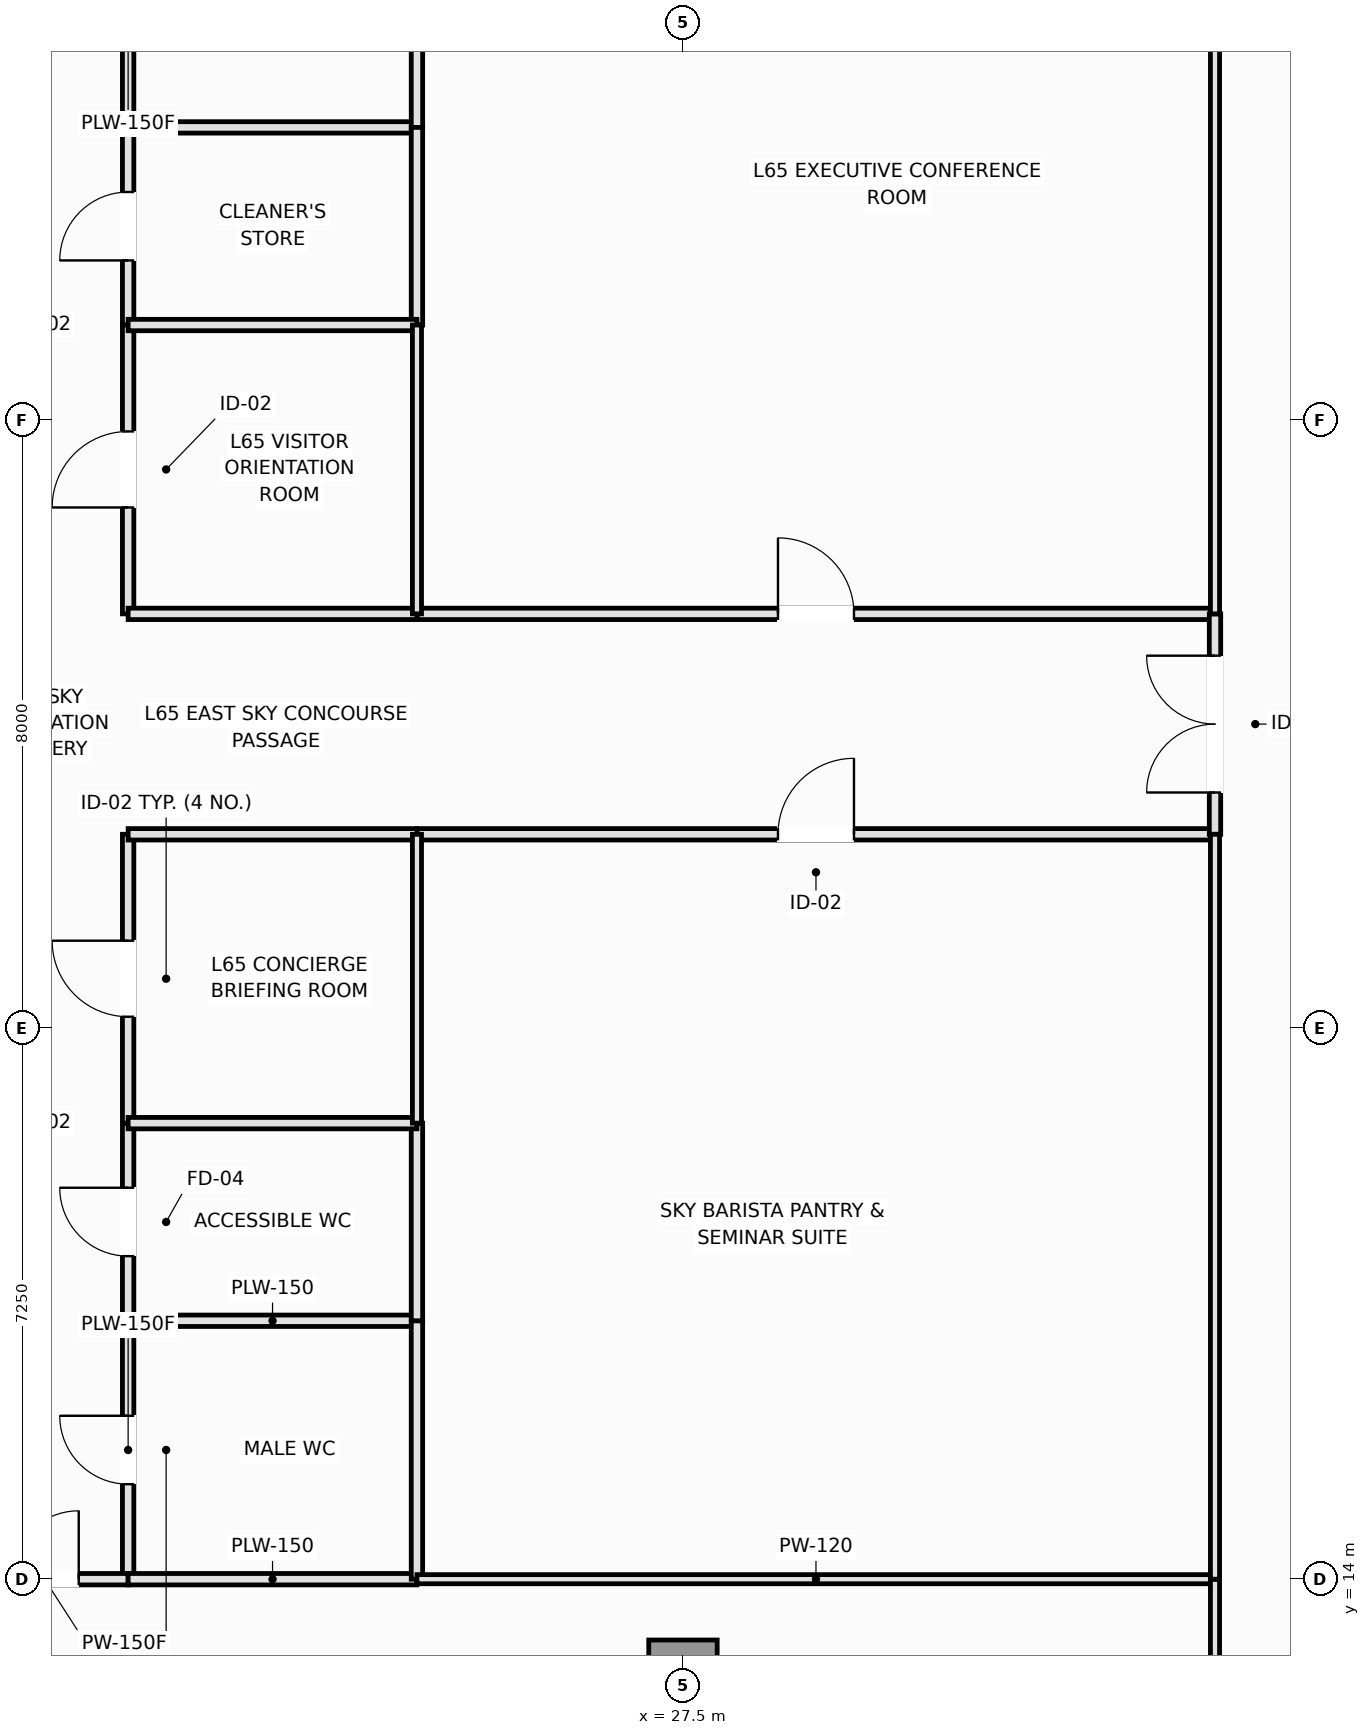
"""IFC4 building model, lengths in metres.
Left out: names, types, materials, properties, quantities, classifications, styles, units other than length and angle.
Written with IfcOpenShell. Run it as: python <this file> out.ifc"""

import sys

from ifc_helpers import new_model, si_unit, direction, frame, frame_2d, origin, origin_2d, place, context, subcontext, project, spatial, rectangle, extrude, element, fill, save


model = new_model("IFC4")
c1 = context("Model", 3, precision=1e-05, world=origin(), true_north=direction((0.0, 1.0)))
c2 = subcontext(c1, "Body", "Model", "MODEL_VIEW")
j1 = project(units=[si_unit("LENGTHUNIT", "METRE"), si_unit("PLANEANGLEUNIT", "RADIAN")], contexts=[c1])
p1 = place(None, origin())
s1 = spatial("IfcSite", under=j1, at=p1, CompositionType="ELEMENT")
p2 = place(p1, origin())
s2 = spatial("IfcBuilding", under=s1, at=p2, CompositionType="ELEMENT")
p3 = place(p2, frame((0.0, 0.0, 244.85)))
s3 = spatial("IfcBuildingStorey", under=s2, at=p3, CompositionType="ELEMENT", Elevation=244.85)
p4 = place(p3, frame((27.5, 12.75, 0.0), z_axis=(0.0, 0.0, 1.0), x_axis=(1.0, 0.0, 0.0)))
e1 = element("IfcColumn", 1, at=p4, inside=s3, PredefinedType="COLUMN", context=c2, shape_type="SweptSolid", body=[
    extrude(rectangle(XDim=0.9, YDim=0.9, at=origin_2d()), origin(), (0.0, 0.0, 1.0), 4.4),
])
p5 = place(p3, frame((20.2, 14.0, 0.0), z_axis=(0.0, 0.0, 1.0), x_axis=(0.0, 1.0, 0.0)))
e2 = element("IfcWall", 2, at=p5, inside=s3, PredefinedType="PLUMBINGWALL", context=c2, shape_type="SweptSolid", body=[
    extrude(rectangle(XDim=3.4, YDim=0.15, at=frame_2d((1.7, 0.0))), origin(), (0.0, 0.0, 1.0), 4.24),
])
p6 = place(p5, frame((1.25, 0.0, 0.0)))
e3 = element("IfcOpeningElement", 3, at=p6, cuts=e2, PredefinedType="OPENING", context=c2, shape_type="SweptSolid", body=[
    extrude(rectangle(XDim=0.9, YDim=2.1, at=frame_2d((0.45, 1.05))), frame((0.0, 0.085, 0.0), z_axis=(0.0, -1.0, 0.0), x_axis=(1.0, 0.0, 0.0)), (0.0, 0.0, 1.0), 0.17),
])
p7 = place(p3, frame((20.2, 33.1, 0.0), z_axis=(0.0, 0.0, 1.0), x_axis=(0.0, 1.0, 0.0)))
e4 = element("IfcWall", 4, at=p7, inside=s3, PredefinedType="PLUMBINGWALL", context=c2, shape_type="SweptSolid", body=[
    extrude(rectangle(XDim=3.4, YDim=0.15, at=frame_2d((1.7, 0.0))), origin(), (0.0, 0.0, 1.0), 4.24),
])
p8 = place(p7, frame((1.25, 0.0, 0.0)))
e5 = element("IfcOpeningElement", 5, at=p8, cuts=e4, PredefinedType="OPENING", context=c2, shape_type="SweptSolid", body=[
    extrude(rectangle(XDim=0.9, YDim=2.1, at=frame_2d((0.45, 1.05))), frame((0.0, 0.085, 0.0), z_axis=(0.0, -1.0, 0.0), x_axis=(1.0, 0.0, 0.0)), (0.0, 0.0, 1.0), 0.17),
])
p9 = place(p3, frame((20.2, 17.4, 0.0), z_axis=(0.0, 0.0, 1.0), x_axis=(0.0, 1.0, 0.0)))
e6 = element("IfcWall", 6, at=p9, inside=s3, PredefinedType="PLUMBINGWALL", context=c2, shape_type="SweptSolid", body=[
    extrude(rectangle(XDim=2.6, YDim=0.15, at=frame_2d((1.3, 0.0))), origin(), (0.0, 0.0, 1.0), 4.24),
])
p10 = place(p9, frame((0.85, 0.0, 0.0)))
e7 = element("IfcOpeningElement", 7, at=p10, cuts=e6, PredefinedType="OPENING", context=c2, shape_type="SweptSolid", body=[
    extrude(rectangle(XDim=0.9, YDim=2.1, at=frame_2d((0.45, 1.05))), frame((0.0, 0.085, 0.0), z_axis=(0.0, -1.0, 0.0), x_axis=(1.0, 0.0, 0.0)), (0.0, 0.0, 1.0), 0.17),
])
p11 = place(p3, frame((20.2, 30.5, 0.0), z_axis=(0.0, 0.0, 1.0), x_axis=(0.0, 1.0, 0.0)))
e8 = element("IfcWall", 8, at=p11, inside=s3, PredefinedType="PLUMBINGWALL", context=c2, shape_type="SweptSolid", body=[
    extrude(rectangle(XDim=2.6, YDim=0.15, at=frame_2d((1.3, 0.0))), origin(), (0.0, 0.0, 1.0), 4.24),
])
p12 = place(p11, frame((0.85, 0.0, 0.0)))
e9 = element("IfcOpeningElement", 9, at=p12, cuts=e8, PredefinedType="OPENING", context=c2, shape_type="SweptSolid", body=[
    extrude(rectangle(XDim=0.9, YDim=2.1, at=frame_2d((0.45, 1.05))), frame((0.0, 0.085, 0.0), z_axis=(0.0, -1.0, 0.0), x_axis=(1.0, 0.0, 0.0)), (0.0, 0.0, 1.0), 0.17),
])
p13 = place(p3, frame((18.0, 14.0, 0.0), z_axis=(0.0, 0.0, 1.0), x_axis=(1.0, 0.0, 0.0)))
e10 = element("IfcWall", 10, at=p13, inside=s3, PredefinedType="PARTITIONING", context=c2, shape_type="SweptSolid", body=[
    extrude(rectangle(XDim=2.2, YDim=0.15, at=frame_2d((1.1, 0.0))), origin(), (0.0, 0.0, 1.0), 4.24),
])
p14 = place(p13, frame((0.65, 0.0, 0.0)))
e11 = element("IfcOpeningElement", 11, at=p14, cuts=e10, PredefinedType="OPENING", context=c2, shape_type="SweptSolid", body=[
    extrude(rectangle(XDim=0.9, YDim=2.1, at=frame_2d((0.45, 1.05))), frame((0.0, 0.085, 0.0), z_axis=(0.0, -1.0, 0.0), x_axis=(1.0, 0.0, 0.0)), (0.0, 0.0, 1.0), 0.17),
])
p15 = place(p3, frame((20.2, 20.0, 0.0), z_axis=(0.0, 0.0, 1.0), x_axis=(0.0, 1.0, 0.0)))
e12 = element("IfcWall", 12, at=p15, inside=s3, PredefinedType="PARTITIONING", context=c2, shape_type="SweptSolid", body=[
    extrude(rectangle(XDim=3.8, YDim=0.15, at=frame_2d((1.9, 0.0))), origin(), (0.0, 0.0, 1.0), 4.24),
])
p16 = place(p15, frame((1.4, 0.0, 0.0)))
e13 = element("IfcOpeningElement", 13, at=p16, cuts=e12, PredefinedType="OPENING", context=c2, shape_type="SweptSolid", body=[
    extrude(rectangle(XDim=1.0, YDim=2.15, at=frame_2d((0.5, 1.075))), frame((0.0, 0.085, 0.0), z_axis=(0.0, -1.0, 0.0), x_axis=(1.0, 0.0, 0.0)), (0.0, 0.0, 1.0), 0.17),
])
p17 = place(p3, frame((20.2, 26.7, 0.0), z_axis=(0.0, 0.0, 1.0), x_axis=(0.0, 1.0, 0.0)))
e14 = element("IfcWall", 14, at=p17, inside=s3, PredefinedType="PARTITIONING", context=c2, shape_type="SweptSolid", body=[
    extrude(rectangle(XDim=3.8, YDim=0.15, at=frame_2d((1.9, 0.0))), origin(), (0.0, 0.0, 1.0), 4.24),
])
p18 = place(p17, frame((1.4, 0.0, 0.0)))
e15 = element("IfcOpeningElement", 15, at=p18, cuts=e14, PredefinedType="OPENING", context=c2, shape_type="SweptSolid", body=[
    extrude(rectangle(XDim=1.0, YDim=2.15, at=frame_2d((0.5, 1.075))), frame((0.0, 0.085, 0.0), z_axis=(0.0, -1.0, 0.0), x_axis=(1.0, 0.0, 0.0)), (0.0, 0.0, 1.0), 0.17),
])
p19 = place(p3, frame((24.0, 23.8, 0.0), z_axis=(0.0, 0.0, 1.0), x_axis=(1.0, 0.0, 0.0)))
e16 = element("IfcWall", 16, at=p19, inside=s3, PredefinedType="PARTITIONING", context=c2, shape_type="SweptSolid", body=[
    extrude(rectangle(XDim=10.5, YDim=0.15, at=frame_2d((5.25, 0.0))), origin(), (0.0, 0.0, 1.0), 4.24),
])
p20 = place(p19, frame((4.75, 0.0, 0.0)))
e17 = element("IfcOpeningElement", 17, at=p20, cuts=e16, PredefinedType="OPENING", context=c2, shape_type="SweptSolid", body=[
    extrude(rectangle(XDim=1.0, YDim=2.15, at=frame_2d((0.5, 1.075))), frame((0.0, 0.085, 0.0), z_axis=(0.0, -1.0, 0.0), x_axis=(1.0, 0.0, 0.0)), (0.0, 0.0, 1.0), 0.17),
])
p21 = place(p3, frame((24.0, 26.7, 0.0), z_axis=(0.0, 0.0, 1.0), x_axis=(1.0, 0.0, 0.0)))
e18 = element("IfcWall", 18, at=p21, inside=s3, PredefinedType="PARTITIONING", context=c2, shape_type="SweptSolid", body=[
    extrude(rectangle(XDim=10.5, YDim=0.15, at=frame_2d((5.25, 0.0))), origin(), (0.0, 0.0, 1.0), 4.24),
])
p22 = place(p21, frame((4.75, 0.0, 0.0)))
e19 = element("IfcOpeningElement", 19, at=p22, cuts=e18, PredefinedType="OPENING", context=c2, shape_type="SweptSolid", body=[
    extrude(rectangle(XDim=1.0, YDim=2.15, at=frame_2d((0.5, 1.075))), frame((0.0, 0.085, 0.0), z_axis=(0.0, -1.0, 0.0), x_axis=(1.0, 0.0, 0.0)), (0.0, 0.0, 1.0), 0.17),
])
p23 = place(p3, frame((34.5, 23.8, 0.0), z_axis=(0.0, 0.0, 1.0), x_axis=(0.0, 1.0, 0.0)))
e20 = element("IfcWall", 20, at=p23, inside=s3, PredefinedType="PARTITIONING", context=c2, shape_type="SweptSolid", body=[
    extrude(rectangle(XDim=2.9, YDim=0.15, at=frame_2d((1.45, 0.0))), origin(), (0.0, 0.0, 1.0), 4.24),
])
p24 = place(p23, frame((0.55, 0.0, 0.0)))
e21 = element("IfcOpeningElement", 21, at=p24, cuts=e20, PredefinedType="OPENING", context=c2, shape_type="SweptSolid", body=[
    extrude(rectangle(XDim=1.8, YDim=2.2, at=frame_2d((0.9, 1.1))), frame((0.0, 0.085, 0.0), z_axis=(0.0, -1.0, 0.0), x_axis=(1.0, 0.0, 0.0)), (0.0, 0.0, 1.0), 0.17),
])
for number, where, z_axis, x_axis in (
    (22, (20.2, 23.8, 0.0), (0.0, 0.0, 1.0), (1.0, 0.0, 0.0)),
    (23, (20.2, 26.7, 0.0), (0.0, 0.0, 1.0), (1.0, 0.0, 0.0)),
):
    element("IfcWall", number, at=place(p3, frame(where, z_axis=z_axis, x_axis=x_axis)), inside=s3, PredefinedType="PARTITIONING", context=c2, shape_type="SweptSolid", body=[
        extrude(rectangle(XDim=3.8, YDim=0.15, at=frame_2d((1.9, 0.0))), origin(), (0.0, 0.0, 1.0), 4.24),
    ])
for number, where, z_axis, x_axis in (
    (24, (20.2, 17.4, 0.0), (0.0, 0.0, 1.0), (1.0, 0.0, 0.0)),
    (25, (20.2, 14.0, 0.0), (0.0, 0.0, 1.0), (1.0, 0.0, 0.0)),
):
    element("IfcWall", number, at=place(p3, frame(where, z_axis=z_axis, x_axis=x_axis)), inside=s3, PredefinedType="PLUMBINGWALL", context=c2, shape_type="SweptSolid", body=[
        extrude(rectangle(XDim=3.8, YDim=0.15, at=frame_2d((1.9, 0.0))), origin(), (0.0, 0.0, 1.0), 4.24),
    ])
p25 = place(p3, frame((24.0, 14.0, 0.0), z_axis=(0.0, 0.0, 1.0), x_axis=(0.0, 1.0, 0.0)))
e26 = element("IfcWall", 26, at=p25, inside=s3, PredefinedType="PLUMBINGWALL", context=c2, shape_type="SweptSolid", body=[
    extrude(rectangle(XDim=3.4, YDim=0.15, at=frame_2d((1.7, 0.0))), origin(), (0.0, 0.0, 1.0), 4.24),
])
p26 = place(p3, frame((20.2, 33.1, 0.0), z_axis=(0.0, 0.0, 1.0), x_axis=(1.0, 0.0, 0.0)))
e27 = element("IfcWall", 27, at=p26, inside=s3, PredefinedType="PLUMBINGWALL", context=c2, shape_type="SweptSolid", body=[
    extrude(rectangle(XDim=3.8, YDim=0.15, at=frame_2d((1.9, 0.0))), origin(), (0.0, 0.0, 1.0), 4.24),
])
p27 = place(p3, frame((24.0, 33.1, 0.0), z_axis=(0.0, 0.0, 1.0), x_axis=(0.0, 1.0, 0.0)))
e28 = element("IfcWall", 28, at=p27, inside=s3, PredefinedType="PLUMBINGWALL", context=c2, shape_type="SweptSolid", body=[
    extrude(rectangle(XDim=3.4, YDim=0.15, at=frame_2d((1.7, 0.0))), origin(), (0.0, 0.0, 1.0), 4.24),
])
p28 = place(p3, frame((24.0, 17.4, 0.0), z_axis=(0.0, 0.0, 1.0), x_axis=(0.0, 1.0, 0.0)))
e29 = element("IfcWall", 29, at=p28, inside=s3, PredefinedType="PLUMBINGWALL", context=c2, shape_type="SweptSolid", body=[
    extrude(rectangle(XDim=2.6, YDim=0.15, at=frame_2d((1.3, 0.0))), origin(), (0.0, 0.0, 1.0), 4.24),
])
p29 = place(p3, frame((20.2, 20.0, 0.0), z_axis=(0.0, 0.0, 1.0), x_axis=(1.0, 0.0, 0.0)))
e30 = element("IfcWall", 30, at=p29, inside=s3, PredefinedType="PLUMBINGWALL", context=c2, shape_type="SweptSolid", body=[
    extrude(rectangle(XDim=3.8, YDim=0.15, at=frame_2d((1.9, 0.0))), origin(), (0.0, 0.0, 1.0), 4.24),
])
p30 = place(p3, frame((24.0, 30.5, 0.0), z_axis=(0.0, 0.0, 1.0), x_axis=(0.0, 1.0, 0.0)))
e31 = element("IfcWall", 31, at=p30, inside=s3, PredefinedType="PLUMBINGWALL", context=c2, shape_type="SweptSolid", body=[
    extrude(rectangle(XDim=2.6, YDim=0.15, at=frame_2d((1.3, 0.0))), origin(), (0.0, 0.0, 1.0), 4.24),
])
p31 = place(p3, frame((20.2, 30.5, 0.0), z_axis=(0.0, 0.0, 1.0), x_axis=(1.0, 0.0, 0.0)))
e32 = element("IfcWall", 32, at=p31, inside=s3, PredefinedType="PLUMBINGWALL", context=c2, shape_type="SweptSolid", body=[
    extrude(rectangle(XDim=3.8, YDim=0.15, at=frame_2d((1.9, 0.0))), origin(), (0.0, 0.0, 1.0), 4.24),
])
p32 = place(p3, frame((24.0, 14.0, 0.0), z_axis=(0.0, 0.0, 1.0), x_axis=(1.0, 0.0, 0.0)))
e33 = element("IfcWall", 33, at=p32, inside=s3, PredefinedType="PARTITIONING", context=c2, shape_type="SweptSolid", body=[
    extrude(rectangle(XDim=10.5, YDim=0.12, at=frame_2d((5.25, 0.0))), origin(), (0.0, 0.0, 1.0), 4.24),
])
p33 = place(p3, frame((34.5, 6.01, 0.0), z_axis=(0.0, 0.0, 1.0), x_axis=(0.0, 1.0, 0.0)))
e34 = element("IfcWall", 34, at=p33, inside=s3, PredefinedType="PARTITIONING", context=c2, shape_type="SweptSolid", body=[
    extrude(rectangle(XDim=7.99, YDim=0.12, at=frame_2d((3.995, 0.0))), origin(), (0.0, 0.0, 1.0), 3.91),
])
p34 = place(p3, frame((34.5, 14.0, 0.0), z_axis=(0.0, 0.0, 1.0), x_axis=(0.0, 1.0, 0.0)))
e35 = element("IfcWall", 35, at=p34, inside=s3, PredefinedType="PARTITIONING", context=c2, shape_type="SweptSolid", body=[
    extrude(rectangle(XDim=9.8, YDim=0.12, at=frame_2d((4.9, 0.0))), origin(), (0.0, 0.0, 1.0), 4.24),
])
p35 = place(p3, frame((24.0, 20.0, 0.0), z_axis=(0.0, 0.0, 1.0), x_axis=(0.0, 1.0, 0.0)))
e36 = element("IfcWall", 36, at=p35, inside=s3, PredefinedType="PARTITIONING", context=c2, shape_type="SweptSolid", body=[
    extrude(rectangle(XDim=3.8, YDim=0.12, at=frame_2d((1.9, 0.0))), origin(), (0.0, 0.0, 1.0), 4.24),
])
p36 = place(p3, frame((34.5, 26.7, 0.0), z_axis=(0.0, 0.0, 1.0), x_axis=(0.0, 1.0, 0.0)))
e37 = element("IfcWall", 37, at=p36, inside=s3, PredefinedType="PARTITIONING", context=c2, shape_type="SweptSolid", body=[
    extrude(rectangle(XDim=9.8, YDim=0.12, at=frame_2d((4.9, 0.0))), origin(), (0.0, 0.0, 1.0), 4.24),
])
p37 = place(p3, frame((24.0, 26.7, 0.0), z_axis=(0.0, 0.0, 1.0), x_axis=(0.0, 1.0, 0.0)))
e38 = element("IfcWall", 38, at=p37, inside=s3, PredefinedType="PARTITIONING", context=c2, shape_type="SweptSolid", body=[
    extrude(rectangle(XDim=3.8, YDim=0.12, at=frame_2d((1.9, 0.0))), origin(), (0.0, 0.0, 1.0), 4.24),
])
p38 = place(p6, origin())
e39 = element("IfcDoor", 39, at=p38, inside=s3, OperationType="SINGLE_SWING_RIGHT", PredefinedType="DOOR", context=c2, shape_type="SweptSolid", body=[
    extrude(rectangle(XDim=0.9, YDim=2.1, at=frame_2d((0.45, 1.05))), frame((0.0, 0.025, 0.0), z_axis=(0.0, -1.0, 0.0), x_axis=(1.0, 0.0, 0.0)), (0.0, 0.0, 1.0), 0.05),
])
fill(e3, e39)
p39 = place(p10, origin())
e40 = element("IfcDoor", 40, at=p39, inside=s3, OperationType="SINGLE_SWING_RIGHT", PredefinedType="DOOR", context=c2, shape_type="SweptSolid", body=[
    extrude(rectangle(XDim=0.9, YDim=2.1, at=frame_2d((0.45, 1.05))), frame((0.0, 0.025, 0.0), z_axis=(0.0, -1.0, 0.0), x_axis=(1.0, 0.0, 0.0)), (0.0, 0.0, 1.0), 0.05),
])
fill(e7, e40)
p40 = place(p12, origin())
e41 = element("IfcDoor", 41, at=p40, inside=s3, OperationType="SINGLE_SWING_LEFT", PredefinedType="DOOR", context=c2, shape_type="SweptSolid", body=[
    extrude(rectangle(XDim=0.9, YDim=2.1, at=frame_2d((0.45, 1.05))), frame((0.0, 0.025, 0.0), z_axis=(0.0, -1.0, 0.0), x_axis=(1.0, 0.0, 0.0)), (0.0, 0.0, 1.0), 0.05),
])
fill(e9, e41)
p41 = place(p14, origin())
e42 = element("IfcDoor", 42, at=p41, inside=s3, OperationType="SINGLE_SWING_RIGHT", PredefinedType="DOOR", context=c2, shape_type="SweptSolid", body=[
    extrude(rectangle(XDim=0.9, YDim=2.1, at=frame_2d((0.45, 1.05))), frame((0.0, 0.025, 0.0), z_axis=(0.0, -1.0, 0.0), x_axis=(1.0, 0.0, 0.0)), (0.0, 0.0, 1.0), 0.05),
])
fill(e11, e42)
p42 = place(p16, origin())
e43 = element("IfcDoor", 43, at=p42, inside=s3, OperationType="SINGLE_SWING_RIGHT", PredefinedType="DOOR", context=c2, shape_type="SweptSolid", body=[
    extrude(rectangle(XDim=1.0, YDim=2.15, at=frame_2d((0.5, 1.075))), frame((0.0, 0.025, 0.0), z_axis=(0.0, -1.0, 0.0), x_axis=(1.0, 0.0, 0.0)), (0.0, 0.0, 1.0), 0.05),
])
fill(e13, e43)
p43 = place(p18, origin())
e44 = element("IfcDoor", 44, at=p43, inside=s3, OperationType="SINGLE_SWING_LEFT", PredefinedType="DOOR", context=c2, shape_type="SweptSolid", body=[
    extrude(rectangle(XDim=1.0, YDim=2.15, at=frame_2d((0.5, 1.075))), frame((0.0, 0.025, 0.0), z_axis=(0.0, -1.0, 0.0), x_axis=(1.0, 0.0, 0.0)), (0.0, 0.0, 1.0), 0.05),
])
fill(e15, e44)
p44 = place(p20, origin())
e45 = element("IfcDoor", 45, at=p44, inside=s3, OperationType="SINGLE_SWING_RIGHT", PredefinedType="DOOR", context=c2, shape_type="SweptSolid", body=[
    extrude(rectangle(XDim=1.0, YDim=2.15, at=frame_2d((0.5, 1.075))), frame((0.0, 0.025, 0.0), z_axis=(0.0, -1.0, 0.0), x_axis=(1.0, 0.0, 0.0)), (0.0, 0.0, 1.0), 0.05),
])
fill(e17, e45)
p45 = place(p22, origin())
e46 = element("IfcDoor", 46, at=p45, inside=s3, OperationType="SINGLE_SWING_LEFT", PredefinedType="DOOR", context=c2, shape_type="SweptSolid", body=[
    extrude(rectangle(XDim=1.0, YDim=2.15, at=frame_2d((0.5, 1.075))), frame((0.0, 0.025, 0.0), z_axis=(0.0, -1.0, 0.0), x_axis=(1.0, 0.0, 0.0)), (0.0, 0.0, 1.0), 0.05),
])
fill(e19, e46)
p46 = place(p24, origin())
e47 = element("IfcDoor", 47, at=p46, inside=s3, OperationType="DOUBLE_DOOR_SINGLE_SWING", PredefinedType="DOOR", context=c2, shape_type="SweptSolid", body=[
    extrude(rectangle(XDim=1.8, YDim=2.2, at=frame_2d((0.9, 1.1))), frame((0.0, 0.025, 0.0), z_axis=(0.0, -1.0, 0.0), x_axis=(1.0, 0.0, 0.0)), (0.0, 0.0, 1.0), 0.05),
])
fill(e21, e47)
save(model, sys.argv[1])
